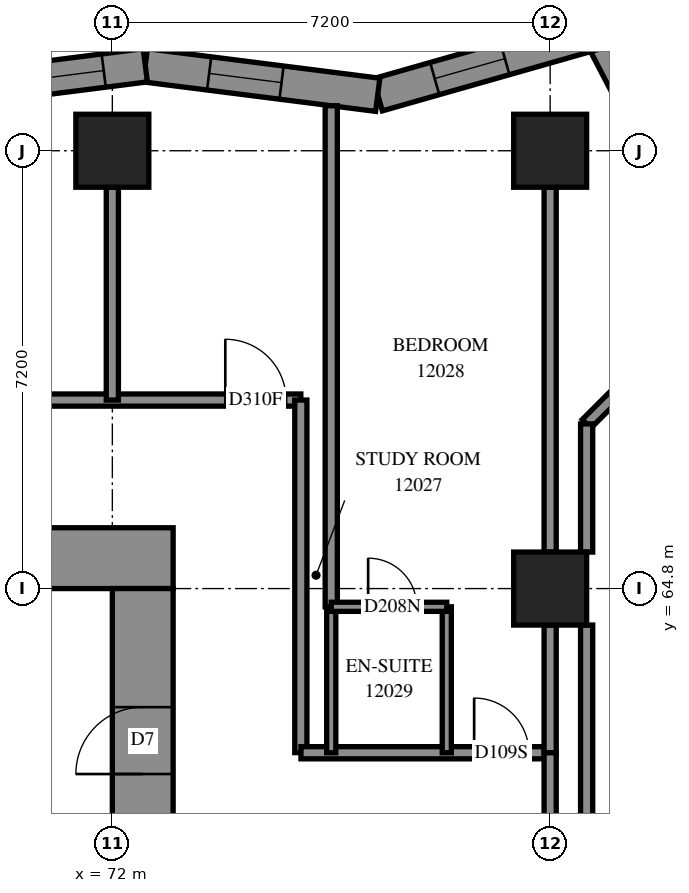
"""IFC4 building model, lengths in metres.
Left out: names, types, materials, properties, quantities, classifications, styles, units other than length and angle.
Written with IfcOpenShell. Run it as: python <this file> out.ifc"""

import sys

from ifc_helpers import new_model, si_unit, direction, frame, frame_2d, origin, origin_2d, place, context, subcontext, project, spatial, polyline, rectangle, outline, extrude, element, fill, save


model = new_model("IFC4")
c1 = context("Model", 3, precision=1e-05, world=origin(), true_north=direction((0.0, 1.0)))
c2 = subcontext(c1, "Body", "Model", "MODEL_VIEW")
j1 = project(units=[si_unit("LENGTHUNIT", "METRE"), si_unit("PLANEANGLEUNIT", "RADIAN")], contexts=[c1])
p1 = place(None, origin())
s1 = spatial("IfcSite", under=j1, at=p1, CompositionType="ELEMENT")
p2 = place(p1, origin())
s2 = spatial("IfcBuilding", under=s1, at=p2, CompositionType="ELEMENT")
p3 = place(p2, frame((0.0, 0.0, 47.4)))
s3 = spatial("IfcBuildingStorey", under=s2, at=p3, CompositionType="ELEMENT", Elevation=47.4)
for number, where, z_axis, x_axis in (
    (1, (72.0, 72.0, 0.0), (0.0, 0.0, 1.0), (1.0, 0.0, 0.0)),
    (2, (79.2, 64.8, 0.0), (0.0, 0.0, 1.0), (1.0, 0.0, 0.0)),
    (3, (79.2, 72.0, 0.0), (0.0, 0.0, 1.0), (1.0, 0.0, 0.0)),
):
    element("IfcColumn", number, at=place(p3, frame(where, z_axis=z_axis, x_axis=x_axis)), inside=s3, PredefinedType="COLUMN", context=c2, shape_type="SweptSolid", body=[
        extrude(rectangle(XDim=1.2, YDim=1.2, at=origin_2d()), origin(), (0.0, 0.0, 1.0), 3.1),
    ])
p4 = place(p3, frame((56.6, 65.3, -0.3), z_axis=(0.0, 0.0, 1.0), x_axis=(1.0, 0.0, 0.0)))
e4 = element("IfcWall", 4, at=p4, inside=s3, PredefinedType="SHEAR", context=c2, shape_type="SweptSolid", body=[
    extrude(rectangle(XDim=16.4, YDim=1.0, at=frame_2d((8.2, 0.0))), origin(), (0.0, 0.0, 1.0), 2.7),
])
p5 = place(p4, frame((11.0, 0.0, 0.3)))
e5 = element("IfcOpeningElement", 5, at=p5, cuts=e4, PredefinedType="OPENING", context=c2, shape_type="SweptSolid", body=[
    extrude(rectangle(XDim=0.8, YDim=2.1, at=frame_2d((0.4, 1.05))), frame((0.0, 0.51, 0.0), z_axis=(0.0, -1.0, 0.0), x_axis=(1.0, 0.0, 0.0)), (0.0, 0.0, 1.0), 1.02),
])
p6 = place(p3, frame((72.5, 50.4, -0.3), z_axis=(0.0, 0.0, 1.0), x_axis=(0.0, 1.0, 0.0)))
e6 = element("IfcWall", 6, at=p6, inside=s3, PredefinedType="SHEAR", context=c2, shape_type="SweptSolid", body=[
    extrude(rectangle(XDim=14.4, YDim=1.0, at=frame_2d((7.2, 0.0))), origin(), (0.0, 0.0, 1.0), 2.7),
])
p7 = place(p6, frame((4.55, 0.0, 0.3)))
e7 = element("IfcOpeningElement", 7, at=p7, cuts=e6, PredefinedType="OPENING", context=c2, shape_type="SweptSolid", body=[
    extrude(rectangle(XDim=1.1, YDim=2.1, at=frame_2d((0.55, 1.05))), frame((0.0, 0.51, 0.0), z_axis=(0.0, -1.0, 0.0), x_axis=(1.0, 0.0, 0.0)), (0.0, 0.0, 1.0), 1.02),
])
p8 = place(p6, frame((11.35, 0.0, 0.3)))
e8 = element("IfcOpeningElement", 8, at=p8, cuts=e6, PredefinedType="OPENING", context=c2, shape_type="SweptSolid", body=[
    extrude(rectangle(XDim=1.1, YDim=2.1, at=frame_2d((0.55, 1.05))), frame((0.0, 0.51, 0.0), z_axis=(0.0, -1.0, 0.0), x_axis=(1.0, 0.0, 0.0)), (0.0, 0.0, 1.0), 1.02),
])
p9 = place(p3, frame((81.593, 70.906, 0.0), z_axis=(0.0, 0.0, 1.0), x_axis=(-0.4619496701, 0.8869061407, 0.0)))
e9 = element("IfcWall", 9, at=p9, inside=s3, PredefinedType="SOLIDWALL", context=c2, shape_type="SweptSolid", body=[
    extrude(outline(polyline([(0.062, -0.275), (3.663, -0.275), (3.214, 0.275), (-0.062, 0.275), (0.062, -0.275)])), origin(), (0.0, 0.0, 1.0), 3.1),
])
p10 = place(p9, frame((0.792, 0.0, 0.5)))
e10 = element("IfcOpeningElement", 10, at=p10, cuts=e9, PredefinedType="OPENING", context=c2, shape_type="SweptSolid", body=[
    extrude(rectangle(XDim=1.2, YDim=2.45, at=frame_2d((0.6, 1.225))), frame((0.0, 0.285, 0.0), z_axis=(0.0, -1.0, 0.0), x_axis=(1.0, 0.0, 0.0)), (0.0, 0.0, 1.0), 0.57),
])
p11 = place(p3, frame((80.005, 73.956, 0.0), z_axis=(0.0, 0.0, 1.0), x_axis=(-0.9618046191, -0.2737368713, 0.0)))
e11 = element("IfcWall", 11, at=p11, inside=s3, PredefinedType="SOLIDWALL", context=c2, shape_type="SweptSolid", body=[
    extrude(outline(polyline([(-0.224, -0.275), (3.728, -0.275), (3.841, 0.275), (0.224, 0.275), (-0.224, -0.275)])), origin(), (0.0, 0.0, 1.0), 3.1),
])
p12 = place(p11, frame((1.611, 0.0, 0.5)))
e12 = element("IfcOpeningElement", 12, at=p12, cuts=e11, PredefinedType="OPENING", context=c2, shape_type="SweptSolid", body=[
    extrude(rectangle(XDim=1.2, YDim=2.45, at=frame_2d((0.6, 1.225))), frame((0.0, 0.285, 0.0), z_axis=(0.0, -1.0, 0.0), x_axis=(1.0, 0.0, 0.0)), (0.0, 0.0, 1.0), 0.57),
])
p13 = place(p3, frame((76.365, 72.92, 0.0), z_axis=(0.0, 0.0, 1.0), x_axis=(-0.9920579561, 0.1257816033, 0.0)))
e13 = element("IfcWall", 13, at=p13, inside=s3, PredefinedType="SOLIDWALL", context=c2, shape_type="SweptSolid", body=[
    extrude(outline(polyline([(0.056, -0.275), (3.888, -0.275), (3.819, 0.275), (-0.056, 0.275), (0.056, -0.275)])), origin(), (0.0, 0.0, 1.0), 3.1),
])
p14 = place(p13, frame((1.595, 0.0, 0.5)))
e14 = element("IfcOpeningElement", 14, at=p14, cuts=e13, PredefinedType="OPENING", context=c2, shape_type="SweptSolid", body=[
    extrude(rectangle(XDim=1.2, YDim=2.45, at=frame_2d((0.6, 1.225))), frame((0.0, 0.285, 0.0), z_axis=(0.0, -1.0, 0.0), x_axis=(1.0, 0.0, 0.0)), (0.0, 0.0, 1.0), 0.57),
])
p15 = place(p3, frame((72.542, 73.405, 0.0), z_axis=(0.0, 0.0, 1.0), x_axis=(-0.9920583495, -0.1257785003, 0.0)))
e15 = element("IfcWall", 15, at=p15, inside=s3, PredefinedType="SOLIDWALL", context=c2, shape_type="SweptSolid", body=[
    extrude(outline(polyline([(-0.035, -0.275), (3.797, -0.275), (3.867, 0.275), (0.035, 0.275), (-0.035, -0.275)])), origin(), (0.0, 0.0, 1.0), 3.1),
])
p16 = place(p15, frame((0.689, 0.0, 0.5)))
e16 = element("IfcOpeningElement", 16, at=p16, cuts=e15, PredefinedType="OPENING", context=c2, shape_type="SweptSolid", body=[
    extrude(rectangle(XDim=2.8, YDim=2.45, at=frame_2d((1.4, 1.225))), frame((0.0, 0.285, 0.0), z_axis=(0.0, -1.0, 0.0), x_axis=(1.0, 0.0, 0.0)), (0.0, 0.0, 1.0), 0.57),
])
p17 = place(p3, frame((54.5, 67.9, 0.0), z_axis=(0.0, 0.0, 1.0), x_axis=(1.0, 0.0, 0.0)))
e17 = element("IfcWall", 17, at=p17, inside=s3, PredefinedType="PARTITIONING", context=c2, shape_type="SweptSolid", body=[
    extrude(rectangle(XDim=20.6, YDim=0.2, at=frame_2d((10.3, 0.0))), origin(), (0.0, 0.0, 1.0), 3.1),
])
p18 = place(p17, frame((0.198, 0.0, 0.0)))
e18 = element("IfcOpeningElement", 18, at=p18, cuts=e17, PredefinedType="OPENING", context=c2, shape_type="SweptSolid", body=[
    extrude(rectangle(XDim=1.0, YDim=2.1, at=frame_2d((0.5, 1.05))), frame((0.0, 0.11, 0.0), z_axis=(0.0, -1.0, 0.0), x_axis=(1.0, 0.0, 0.0)), (0.0, 0.0, 1.0), 0.22),
])
p19 = place(p17, frame((19.358, 0.0, 0.0)))
e19 = element("IfcOpeningElement", 19, at=p19, cuts=e17, PredefinedType="OPENING", context=c2, shape_type="SweptSolid", body=[
    extrude(rectangle(XDim=1.0, YDim=2.1, at=frame_2d((0.5, 1.05))), frame((0.0, 0.11, 0.0), z_axis=(0.0, -1.0, 0.0), x_axis=(1.0, 0.0, 0.0)), (0.0, 0.0, 1.0), 0.22),
])
p20 = place(p17, frame((6.698, 0.0, 0.0)))
e20 = element("IfcOpeningElement", 20, at=p20, cuts=e17, PredefinedType="OPENING", context=c2, shape_type="SweptSolid", body=[
    extrude(rectangle(XDim=0.9, YDim=2.1, at=frame_2d((0.45, 1.05))), frame((0.0, 0.11, 0.0), z_axis=(0.0, -1.0, 0.0), x_axis=(1.0, 0.0, 0.0)), (0.0, 0.0, 1.0), 0.22),
])
p21 = place(p17, frame((13.884, 0.0, 0.0)))
e21 = element("IfcOpeningElement", 21, at=p21, cuts=e17, PredefinedType="OPENING", context=c2, shape_type="SweptSolid", body=[
    extrude(rectangle(XDim=1.0, YDim=2.1, at=frame_2d((0.5, 1.05))), frame((0.0, 0.11, 0.0), z_axis=(0.0, -1.0, 0.0), x_axis=(1.0, 0.0, 0.0)), (0.0, 0.0, 1.0), 0.22),
])
p22 = place(p3, frame((75.6, 64.5, 0.0), z_axis=(0.0, 0.0, 1.0), x_axis=(0.0, 1.0, 0.0)))
e22 = element("IfcWall", 22, at=p22, inside=s3, PredefinedType="PARTITIONING", context=c2, shape_type="SweptSolid", body=[
    extrude(rectangle(XDim=8.24, YDim=0.2, at=frame_2d((4.12, 0.0))), origin(), (0.0, 0.0, 1.0), 3.1),
])
p23 = place(p3, frame((79.2, 65.4, 0.0), z_axis=(0.0, 0.0, 1.0), x_axis=(0.0, 1.0, 0.0)))
e23 = element("IfcWall", 23, at=p23, inside=s3, PredefinedType="PARTITIONING", context=c2, shape_type="SweptSolid", body=[
    extrude(rectangle(XDim=6.0, YDim=0.2, at=frame_2d((3.0, 0.0))), origin(), (0.0, 0.0, 1.0), 3.1),
])
p24 = place(p3, frame((75.1, 62.102, 0.0), z_axis=(0.0, 0.0, 1.0), x_axis=(0.0, 1.0, 0.0)))
e24 = element("IfcWall", 24, at=p24, inside=s3, PredefinedType="PARTITIONING", context=c2, shape_type="SweptSolid", body=[
    extrude(rectangle(XDim=5.798, YDim=0.2, at=frame_2d((2.899, 0.0))), origin(), (0.0, 0.0, 1.0), 3.1),
])
p25 = place(p3, frame((79.8, 59.45, 0.0), z_axis=(0.0, 0.0, 1.0), x_axis=(0.0, 1.0, 0.0)))
e25 = element("IfcWall", 25, at=p25, inside=s3, PredefinedType="PARTITIONING", context=c2, shape_type="SweptSolid", body=[
    extrude(rectangle(XDim=4.75, YDim=0.2, at=frame_2d((2.375, 0.0))), origin(), (0.0, 0.0, 1.0), 3.1),
])
p26 = place(p3, frame((75.102, 62.1, 0.0), z_axis=(0.0, 0.0, 1.0), x_axis=(1.0, 0.0, 0.0)))
e26 = element("IfcWall", 26, at=p26, inside=s3, PredefinedType="PARTITIONING", context=c2, shape_type="SweptSolid", body=[
    extrude(rectangle(XDim=4.098, YDim=0.2, at=frame_2d((2.049, 0.0))), origin(), (0.0, 0.0, 1.0), 3.1),
])
p27 = place(p26, frame((2.848, 0.0, 0.0)))
e27 = element("IfcOpeningElement", 27, at=p27, cuts=e26, PredefinedType="OPENING", context=c2, shape_type="SweptSolid", body=[
    extrude(rectangle(XDim=0.9, YDim=2.1, at=frame_2d((0.45, 1.05))), frame((0.0, 0.11, 0.0), z_axis=(0.0, -1.0, 0.0), x_axis=(1.0, 0.0, 0.0)), (0.0, 0.0, 1.0), 0.22),
])
p28 = place(p3, frame((79.799, 67.509, 0.0), z_axis=(0.0, 0.0, 1.0), x_axis=(0.7070927062, 0.7071208559, 0.0)))
e28 = element("IfcWall", 28, at=p28, inside=s3, PredefinedType="PARTITIONING", context=c2, shape_type="SweptSolid", body=[
    extrude(rectangle(XDim=3.552, YDim=0.2, at=frame_2d((1.776, 0.0))), origin(), (0.0, 0.0, 1.0), 3.1),
])
p29 = place(p3, frame((72.0, 67.9, 0.0), z_axis=(0.0, 0.0, 1.0), x_axis=(0.0, 1.0, 0.0)))
e29 = element("IfcWall", 29, at=p29, inside=s3, PredefinedType="PARTITIONING", context=c2, shape_type="SweptSolid", body=[
    extrude(rectangle(XDim=3.5, YDim=0.2, at=frame_2d((1.75, 0.0))), origin(), (0.0, 0.0, 1.0), 3.1),
])
for number, where, z_axis, x_axis in (
    (30, (75.6, 62.1, 0.0), (0.0, 0.0, 1.0), (0.0, 1.0, 0.0)),
    (31, (77.5, 62.1, 0.0), (0.0, 0.0, 1.0), (0.0, 1.0, 0.0)),
):
    element("IfcWall", number, at=place(p3, frame(where, z_axis=z_axis, x_axis=x_axis)), inside=s3, PredefinedType="PARTITIONING", context=c2, shape_type="SweptSolid", body=[
        extrude(rectangle(XDim=2.4, YDim=0.15, at=frame_2d((1.2, 0.0))), origin(), (0.0, 0.0, 1.0), 3.1),
    ])
p30 = place(p3, frame((79.8, 65.4, 0.0), z_axis=(0.0, 0.0, 1.0), x_axis=(0.0, 1.0, 0.0)))
e32 = element("IfcWall", 32, at=p30, inside=s3, PredefinedType="PARTITIONING", context=c2, shape_type="SweptSolid", body=[
    extrude(rectangle(XDim=2.108, YDim=0.2, at=frame_2d((1.054, 0.0))), origin(), (0.0, 0.0, 1.0), 3.1),
])
p31 = place(p3, frame((79.2, 62.1, 0.0), z_axis=(0.0, 0.0, 1.0), x_axis=(0.0, 1.0, 0.0)))
e33 = element("IfcWall", 33, at=p31, inside=s3, PredefinedType="PARTITIONING", context=c2, shape_type="SweptSolid", body=[
    extrude(rectangle(XDim=2.1, YDim=0.2, at=frame_2d((1.05, 0.0))), origin(), (0.0, 0.0, 1.0), 3.1),
])
p32 = place(p3, frame((75.6, 64.5, 0.0), z_axis=(0.0, 0.0, 1.0), x_axis=(1.0, 0.0, 0.0)))
e34 = element("IfcWall", 34, at=p32, inside=s3, PredefinedType="PARTITIONING", context=c2, shape_type="SweptSolid", body=[
    extrude(rectangle(XDim=1.9, YDim=0.15, at=frame_2d((0.95, 0.0))), origin(), (0.0, 0.0, 1.0), 3.1),
])
p33 = place(p32, frame((0.607, 0.0, 0.0)))
e35 = element("IfcOpeningElement", 35, at=p33, cuts=e34, PredefinedType="OPENING", context=c2, shape_type="SweptSolid", body=[
    extrude(rectangle(XDim=0.8, YDim=2.1, at=frame_2d((0.4, 1.05))), frame((0.0, 0.085, 0.0), z_axis=(0.0, -1.0, 0.0), x_axis=(1.0, 0.0, 0.0)), (0.0, 0.0, 1.0), 0.17),
])
p34 = place(p3, frame((79.2, 60.3, 0.0), z_axis=(0.0, 0.0, 1.0), x_axis=(0.0, 1.0, 0.0)))
e36 = element("IfcWall", 36, at=p34, inside=s3, PredefinedType="PARTITIONING", context=c2, shape_type="SweptSolid", body=[
    extrude(rectangle(XDim=1.8, YDim=0.2, at=frame_2d((0.9, 0.0))), origin(), (0.0, 0.0, 1.0), 3.1),
])
p35 = place(p12, origin())
e37 = element("IfcWindow", 37, at=p35, inside=s3, PartitioningType="SINGLE_PANEL", PredefinedType="WINDOW", context=c2, shape_type="SweptSolid", body=[
    extrude(rectangle(XDim=1.2, YDim=2.45, at=frame_2d((0.6, 1.225))), frame((0.0, 0.155, 0.0), z_axis=(0.0, -1.0, 0.0), x_axis=(1.0, 0.0, 0.0)), (0.0, 0.0, 1.0), 0.06),
])
fill(e12, e37)
p36 = place(p14, origin())
e38 = element("IfcWindow", 38, at=p36, inside=s3, PartitioningType="SINGLE_PANEL", PredefinedType="WINDOW", context=c2, shape_type="SweptSolid", body=[
    extrude(rectangle(XDim=1.2, YDim=2.45, at=frame_2d((0.6, 1.225))), frame((0.0, 0.155, 0.0), z_axis=(0.0, -1.0, 0.0), x_axis=(1.0, 0.0, 0.0)), (0.0, 0.0, 1.0), 0.06),
])
fill(e14, e38)
p37 = place(p16, origin())
e39 = element("IfcWindow", 39, at=p37, inside=s3, PartitioningType="SINGLE_PANEL", PredefinedType="WINDOW", context=c2, shape_type="SweptSolid", body=[
    extrude(rectangle(XDim=2.8, YDim=2.45, at=frame_2d((1.4, 1.225))), frame((0.0, 0.155, 0.0), z_axis=(0.0, -1.0, 0.0), x_axis=(1.0, 0.0, 0.0)), (0.0, 0.0, 1.0), 0.06),
])
fill(e16, e39)
p38 = place(p8, origin())
e40 = element("IfcDoor", 40, at=p38, inside=s3, OperationType="SINGLE_SWING_RIGHT", PredefinedType="DOOR", context=c2, shape_type="SweptSolid", body=[
    extrude(rectangle(XDim=1.1, YDim=2.1, at=frame_2d((0.55, 1.05))), frame((0.0, 0.025, 0.0), z_axis=(0.0, -1.0, 0.0), x_axis=(1.0, 0.0, 0.0)), (0.0, 0.0, 1.0), 0.05),
])
fill(e8, e40)
p39 = place(p19, origin())
e41 = element("IfcDoor", 41, at=p39, inside=s3, OperationType="SINGLE_SWING_RIGHT", PredefinedType="DOOR", context=c2, shape_type="SweptSolid", body=[
    extrude(rectangle(XDim=1.0, YDim=2.1, at=frame_2d((0.5, 1.05))), frame((0.0, 0.025, 0.0), z_axis=(0.0, -1.0, 0.0), x_axis=(1.0, 0.0, 0.0)), (0.0, 0.0, 1.0), 0.05),
])
fill(e19, e41)
p40 = place(p27, origin())
e42 = element("IfcDoor", 42, at=p40, inside=s3, OperationType="SINGLE_SWING_LEFT", PredefinedType="DOOR", context=c2, shape_type="SweptSolid", body=[
    extrude(rectangle(XDim=0.9, YDim=2.1, at=frame_2d((0.45, 1.05))), frame((0.0, 0.025, 0.0), z_axis=(0.0, -1.0, 0.0), x_axis=(1.0, 0.0, 0.0)), (0.0, 0.0, 1.0), 0.05),
])
fill(e27, e42)
p41 = place(p33, origin())
e43 = element("IfcDoor", 43, at=p41, inside=s3, OperationType="SINGLE_SWING_RIGHT", PredefinedType="DOOR", context=c2, shape_type="SweptSolid", body=[
    extrude(rectangle(XDim=0.8, YDim=2.1, at=frame_2d((0.4, 1.05))), frame((0.0, 0.025, 0.0), z_axis=(0.0, -1.0, 0.0), x_axis=(1.0, 0.0, 0.0)), (0.0, 0.0, 1.0), 0.05),
])
fill(e35, e43)
save(model, sys.argv[1])
